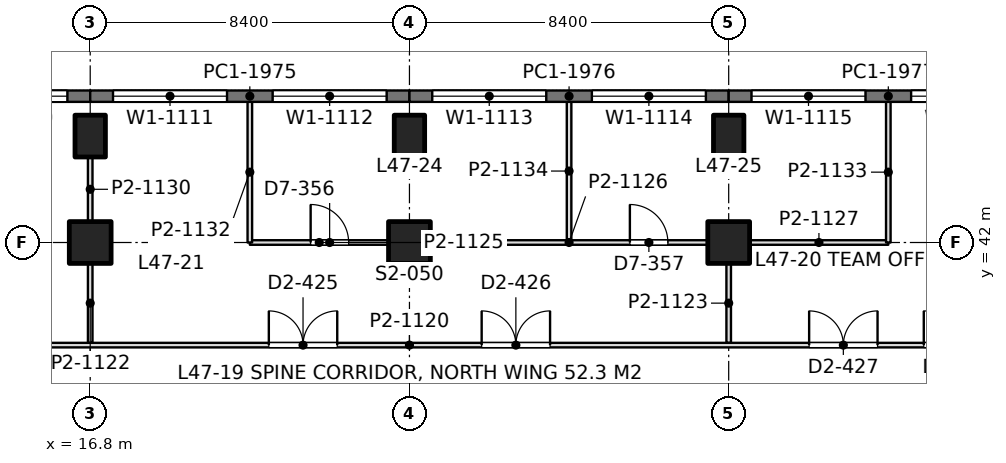
"""IFC4 building model, lengths in metres.
Left out: names, types, materials, properties, quantities, classifications, styles, units other than length and angle.
Written with IfcOpenShell. Run it as: python <this file> out.ifc"""

import sys

from ifc_helpers import new_model, si_unit, direction, frame, frame_2d, origin, origin_2d, place, context, subcontext, project, spatial, rectangle, extrude, element, fill, save


model = new_model("IFC4")
c1 = context("Model", 3, precision=1e-05, world=origin(), true_north=direction((0.0, 1.0)))
c2 = subcontext(c1, "Body", "Model", "MODEL_VIEW")
j1 = project(units=[si_unit("LENGTHUNIT", "METRE"), si_unit("PLANEANGLEUNIT", "RADIAN")], contexts=[c1])
p1 = place(None, origin())
s1 = spatial("IfcSite", under=j1, at=p1, CompositionType="ELEMENT")
p2 = place(p1, origin())
s2 = spatial("IfcBuilding", under=s1, at=p2, CompositionType="ELEMENT")
p3 = place(p2, frame((0.0, 0.0, 207.0)))
s3 = spatial("IfcBuildingStorey", under=s2, at=p3, CompositionType="ELEMENT", Elevation=207.0)
p4 = place(p3, frame((16.8, 42.0, 0.0), z_axis=(0.0, 0.0, 1.0), x_axis=(1.0, 0.0, 0.0)))
e1 = element("IfcColumn", 1, at=p4, inside=s3, PredefinedType="COLUMN", context=c2, shape_type="SweptSolid", body=[
    extrude(rectangle(XDim=1.1, YDim=1.1, at=origin_2d()), origin(), (0.0, 0.0, 1.0), 4.2),
])
p5 = place(p3, frame((16.8, 44.8, 0.0), z_axis=(0.0, 0.0, 1.0), x_axis=(1.0, 0.0, 0.0)))
e2 = element("IfcColumn", 2, at=p5, inside=s3, PredefinedType="COLUMN", context=c2, shape_type="SweptSolid", body=[
    extrude(rectangle(XDim=0.8, YDim=1.1, at=origin_2d()), origin(), (0.0, 0.0, 1.0), 4.2),
])
p6 = place(p3, frame((25.2, 42.0, 0.0), z_axis=(0.0, 0.0, 1.0), x_axis=(1.0, 0.0, 0.0)))
e3 = element("IfcColumn", 3, at=p6, inside=s3, PredefinedType="COLUMN", context=c2, shape_type="SweptSolid", body=[
    extrude(rectangle(XDim=1.1, YDim=1.1, at=origin_2d()), origin(), (0.0, 0.0, 1.0), 4.2),
])
p7 = place(p3, frame((25.2, 44.8, 0.0), z_axis=(0.0, 0.0, 1.0), x_axis=(1.0, 0.0, 0.0)))
e4 = element("IfcColumn", 4, at=p7, inside=s3, PredefinedType="COLUMN", context=c2, shape_type="SweptSolid", body=[
    extrude(rectangle(XDim=0.8, YDim=1.1, at=origin_2d()), origin(), (0.0, 0.0, 1.0), 4.2),
])
p8 = place(p3, frame((33.6, 42.0, 0.0), z_axis=(0.0, 0.0, 1.0), x_axis=(1.0, 0.0, 0.0)))
e5 = element("IfcColumn", 5, at=p8, inside=s3, PredefinedType="COLUMN", context=c2, shape_type="SweptSolid", body=[
    extrude(rectangle(XDim=1.1, YDim=1.1, at=origin_2d()), origin(), (0.0, 0.0, 1.0), 4.2),
])
p9 = place(p3, frame((33.6, 44.8, 0.0), z_axis=(0.0, 0.0, 1.0), x_axis=(1.0, 0.0, 0.0)))
e6 = element("IfcColumn", 6, at=p9, inside=s3, PredefinedType="COLUMN", context=c2, shape_type="SweptSolid", body=[
    extrude(rectangle(XDim=0.8, YDim=1.1, at=origin_2d()), origin(), (0.0, 0.0, 1.0), 4.2),
])
p10 = place(p3, frame((8.4, 45.85, 0.0), z_axis=(0.0, 0.0, 1.0), x_axis=(1.0, 0.0, 0.0)))
e7 = element("IfcWall", 7, at=p10, inside=s3, PredefinedType="SOLIDWALL", context=c2, shape_type="SweptSolid", body=[
    extrude(rectangle(XDim=8.4, YDim=0.3, at=frame_2d((4.2, 0.0))), origin(), (0.0, 0.0, 1.0), 4.05),
])
p11 = place(p10, frame((0.6, 0.0, 0.9)))
e8 = element("IfcOpeningElement", 8, at=p11, cuts=e7, PredefinedType="OPENING", context=c2, shape_type="SweptSolid", body=[
    extrude(rectangle(XDim=3.0, YDim=1.9, at=frame_2d((1.5, 0.95))), frame((0.0, 0.16, 0.0), z_axis=(0.0, -1.0, 0.0), x_axis=(1.0, 0.0, 0.0)), (0.0, 0.0, 1.0), 0.32),
])
p12 = place(p10, frame((4.8, 0.0, 0.9)))
e9 = element("IfcOpeningElement", 9, at=p12, cuts=e7, PredefinedType="OPENING", context=c2, shape_type="SweptSolid", body=[
    extrude(rectangle(XDim=3.0, YDim=1.9, at=frame_2d((1.5, 0.95))), frame((0.0, 0.16, 0.0), z_axis=(0.0, -1.0, 0.0), x_axis=(1.0, 0.0, 0.0)), (0.0, 0.0, 1.0), 0.32),
])
p13 = place(p3, frame((16.8, 45.85, 0.0), z_axis=(0.0, 0.0, 1.0), x_axis=(1.0, 0.0, 0.0)))
e10 = element("IfcWall", 10, at=p13, inside=s3, PredefinedType="SOLIDWALL", context=c2, shape_type="SweptSolid", body=[
    extrude(rectangle(XDim=8.4, YDim=0.3, at=frame_2d((4.2, 0.0))), origin(), (0.0, 0.0, 1.0), 4.05),
])
p14 = place(p13, frame((0.6, 0.0, 0.9)))
e11 = element("IfcOpeningElement", 11, at=p14, cuts=e10, PredefinedType="OPENING", context=c2, shape_type="SweptSolid", body=[
    extrude(rectangle(XDim=3.0, YDim=1.9, at=frame_2d((1.5, 0.95))), frame((0.0, 0.16, 0.0), z_axis=(0.0, -1.0, 0.0), x_axis=(1.0, 0.0, 0.0)), (0.0, 0.0, 1.0), 0.32),
])
p15 = place(p13, frame((4.8, 0.0, 0.9)))
e12 = element("IfcOpeningElement", 12, at=p15, cuts=e10, PredefinedType="OPENING", context=c2, shape_type="SweptSolid", body=[
    extrude(rectangle(XDim=3.0, YDim=1.9, at=frame_2d((1.5, 0.95))), frame((0.0, 0.16, 0.0), z_axis=(0.0, -1.0, 0.0), x_axis=(1.0, 0.0, 0.0)), (0.0, 0.0, 1.0), 0.32),
])
p16 = place(p3, frame((25.2, 45.85, 0.0), z_axis=(0.0, 0.0, 1.0), x_axis=(1.0, 0.0, 0.0)))
e13 = element("IfcWall", 13, at=p16, inside=s3, PredefinedType="SOLIDWALL", context=c2, shape_type="SweptSolid", body=[
    extrude(rectangle(XDim=8.4, YDim=0.3, at=frame_2d((4.2, 0.0))), origin(), (0.0, 0.0, 1.0), 4.05),
])
p17 = place(p16, frame((0.6, 0.0, 0.9)))
e14 = element("IfcOpeningElement", 14, at=p17, cuts=e13, PredefinedType="OPENING", context=c2, shape_type="SweptSolid", body=[
    extrude(rectangle(XDim=3.0, YDim=1.9, at=frame_2d((1.5, 0.95))), frame((0.0, 0.16, 0.0), z_axis=(0.0, -1.0, 0.0), x_axis=(1.0, 0.0, 0.0)), (0.0, 0.0, 1.0), 0.32),
])
p18 = place(p16, frame((4.8, 0.0, 0.9)))
e15 = element("IfcOpeningElement", 15, at=p18, cuts=e13, PredefinedType="OPENING", context=c2, shape_type="SweptSolid", body=[
    extrude(rectangle(XDim=3.0, YDim=1.9, at=frame_2d((1.5, 0.95))), frame((0.0, 0.16, 0.0), z_axis=(0.0, -1.0, 0.0), x_axis=(1.0, 0.0, 0.0)), (0.0, 0.0, 1.0), 0.32),
])
p19 = place(p3, frame((33.6, 45.85, 0.0), z_axis=(0.0, 0.0, 1.0), x_axis=(1.0, 0.0, 0.0)))
e16 = element("IfcWall", 16, at=p19, inside=s3, PredefinedType="SOLIDWALL", context=c2, shape_type="SweptSolid", body=[
    extrude(rectangle(XDim=8.4, YDim=0.3, at=frame_2d((4.2, 0.0))), origin(), (0.0, 0.0, 1.0), 4.05),
])
p20 = place(p19, frame((0.6, 0.0, 0.9)))
e17 = element("IfcOpeningElement", 17, at=p20, cuts=e16, PredefinedType="OPENING", context=c2, shape_type="SweptSolid", body=[
    extrude(rectangle(XDim=3.0, YDim=1.9, at=frame_2d((1.5, 0.95))), frame((0.0, 0.16, 0.0), z_axis=(0.0, -1.0, 0.0), x_axis=(1.0, 0.0, 0.0)), (0.0, 0.0, 1.0), 0.32),
])
p21 = place(p19, frame((4.8, 0.0, 0.9)))
e18 = element("IfcOpeningElement", 18, at=p21, cuts=e16, PredefinedType="OPENING", context=c2, shape_type="SweptSolid", body=[
    extrude(rectangle(XDim=3.0, YDim=1.9, at=frame_2d((1.5, 0.95))), frame((0.0, 0.16, 0.0), z_axis=(0.0, -1.0, 0.0), x_axis=(1.0, 0.0, 0.0)), (0.0, 0.0, 1.0), 0.32),
])
p22 = place(p3, frame((21.0, 42.0, 0.0), z_axis=(0.0, 0.0, 1.0), x_axis=(1.0, 0.0, 0.0)))
e19 = element("IfcWall", 19, at=p22, inside=s3, PredefinedType="PARTITIONING", context=c2, shape_type="SweptSolid", body=[
    extrude(rectangle(XDim=3.651, YDim=0.12, at=frame_2d((1.825, 0.0))), origin(), (0.0, 0.0, 1.0), 3.55),
])
p23 = place(p22, frame((1.6, 0.0, 0.0)))
e20 = element("IfcOpeningElement", 20, at=p23, cuts=e19, PredefinedType="OPENING", context=c2, shape_type="SweptSolid", body=[
    extrude(rectangle(XDim=1.0, YDim=2.4, at=frame_2d((0.5, 1.2))), frame((0.0, 0.07, 0.0), z_axis=(0.0, -1.0, 0.0), x_axis=(1.0, 0.0, 0.0)), (0.0, 0.0, 1.0), 0.14),
])
p24 = place(p3, frame((25.749, 42.0, 0.0), z_axis=(0.0, 0.0, 1.0), x_axis=(1.0, 0.0, 0.0)))
e21 = element("IfcWall", 21, at=p24, inside=s3, PredefinedType="PARTITIONING", context=c2, shape_type="SweptSolid", body=[
    extrude(rectangle(XDim=7.302, YDim=0.12, at=frame_2d((3.651, 0.0))), origin(), (0.0, 0.0, 1.0), 3.55),
])
p25 = place(p24, frame((5.251, 0.0, 0.0)))
e22 = element("IfcOpeningElement", 22, at=p25, cuts=e21, PredefinedType="OPENING", context=c2, shape_type="SweptSolid", body=[
    extrude(rectangle(XDim=1.0, YDim=2.4, at=frame_2d((0.5, 1.2))), frame((0.0, 0.07, 0.0), z_axis=(0.0, -1.0, 0.0), x_axis=(1.0, 0.0, 0.0)), (0.0, 0.0, 1.0), 0.14),
])
p26 = place(p3, frame((34.149, 42.0, 0.0), z_axis=(0.0, 0.0, 1.0), x_axis=(1.0, 0.0, 0.0)))
e23 = element("IfcWall", 23, at=p26, inside=s3, PredefinedType="PARTITIONING", context=c2, shape_type="SweptSolid", body=[
    extrude(rectangle(XDim=3.651, YDim=0.12, at=frame_2d((1.826, 0.0))), origin(), (0.0, 0.0, 1.0), 3.55),
])
p27 = place(p3, frame((21.0, 42.0, 0.0), z_axis=(0.0, 0.0, 1.0), x_axis=(0.0, 1.0, 0.0)))
e24 = element("IfcWall", 24, at=p27, inside=s3, PredefinedType="PARTITIONING", context=c2, shape_type="SweptSolid", body=[
    extrude(rectangle(XDim=3.702, YDim=0.12, at=frame_2d((1.851, 0.0))), origin(), (0.0, 0.0, 1.0), 3.55),
])
p28 = place(p3, frame((29.4, 42.058, 0.0), z_axis=(0.0, 0.0, 1.0), x_axis=(0.0, 1.0, 0.0)))
e25 = element("IfcWall", 25, at=p28, inside=s3, PredefinedType="PARTITIONING", context=c2, shape_type="SweptSolid", body=[
    extrude(rectangle(XDim=3.644, YDim=0.12, at=frame_2d((1.822, 0.0))), origin(), (0.0, 0.0, 1.0), 3.55),
])
p29 = place(p3, frame((37.8, 42.0, 0.0), z_axis=(0.0, 0.0, 1.0), x_axis=(0.0, 1.0, 0.0)))
e26 = element("IfcWall", 26, at=p29, inside=s3, PredefinedType="PARTITIONING", context=c2, shape_type="SweptSolid", body=[
    extrude(rectangle(XDim=3.702, YDim=0.12, at=frame_2d((1.851, 0.0))), origin(), (0.0, 0.0, 1.0), 3.55),
])
p30 = place(p3, frame((16.8, 39.358, 0.0), z_axis=(0.0, 0.0, 1.0), x_axis=(0.0, 1.0, 0.0)))
e27 = element("IfcWall", 27, at=p30, inside=s3, PredefinedType="PARTITIONING", context=c2, shape_type="SweptSolid", body=[
    extrude(rectangle(XDim=2.093, YDim=0.12, at=frame_2d((1.046, 0.0))), origin(), (0.0, 0.0, 1.0), 3.69),
])
p31 = place(p3, frame((16.8, 42.549, 0.0), z_axis=(0.0, 0.0, 1.0), x_axis=(0.0, 1.0, 0.0)))
e28 = element("IfcWall", 28, at=p31, inside=s3, PredefinedType="PARTITIONING", context=c2, shape_type="SweptSolid", body=[
    extrude(rectangle(XDim=1.702, YDim=0.12, at=frame_2d((0.851, 0.0))), origin(), (0.0, 0.0, 1.0), 3.69),
])
p32 = place(p3, frame((33.6, 39.358, 0.0), z_axis=(0.0, 0.0, 1.0), x_axis=(0.0, 1.0, 0.0)))
e29 = element("IfcWall", 29, at=p32, inside=s3, PredefinedType="PARTITIONING", context=c2, shape_type="SweptSolid", body=[
    extrude(rectangle(XDim=2.093, YDim=0.12, at=frame_2d((1.046, 0.0))), origin(), (0.0, 0.0, 1.0), 3.69),
])
p33 = place(p3, frame((7.748, 39.3, 0.0), z_axis=(0.0, 0.0, 1.0), x_axis=(1.0, 0.0, 0.0)))
e30 = element("IfcWall", 30, at=p33, inside=s3, PredefinedType="PARTITIONING", context=c2, shape_type="SweptSolid", body=[
    extrude(rectangle(XDim=34.904, YDim=0.12, at=frame_2d((17.452, 0.0))), origin(), (0.0, 0.0, 1.0), 3.55),
])
p34 = place(p33, frame((2.119, 0.0, 0.0)))
e31 = element("IfcOpeningElement", 31, at=p34, cuts=e30, PredefinedType="OPENING", context=c2, shape_type="SweptSolid", body=[
    extrude(rectangle(XDim=1.8, YDim=2.2, at=frame_2d((0.9, 1.1))), frame((0.0, 0.07, 0.0), z_axis=(0.0, -1.0, 0.0), x_axis=(1.0, 0.0, 0.0)), (0.0, 0.0, 1.0), 0.14),
])
p35 = place(p33, frame((5.135, 0.0, 0.0)))
e32 = element("IfcOpeningElement", 32, at=p35, cuts=e30, PredefinedType="OPENING", context=c2, shape_type="SweptSolid", body=[
    extrude(rectangle(XDim=1.8, YDim=2.2, at=frame_2d((0.9, 1.1))), frame((0.0, 0.07, 0.0), z_axis=(0.0, -1.0, 0.0), x_axis=(1.0, 0.0, 0.0)), (0.0, 0.0, 1.0), 0.14),
])
p36 = place(p33, frame((13.752, 0.0, 0.0)))
e33 = element("IfcOpeningElement", 33, at=p36, cuts=e30, PredefinedType="OPENING", context=c2, shape_type="SweptSolid", body=[
    extrude(rectangle(XDim=1.8, YDim=2.2, at=frame_2d((0.9, 1.1))), frame((0.0, 0.07, 0.0), z_axis=(0.0, -1.0, 0.0), x_axis=(1.0, 0.0, 0.0)), (0.0, 0.0, 1.0), 0.14),
])
p37 = place(p33, frame((19.352, 0.0, 0.0)))
e34 = element("IfcOpeningElement", 34, at=p37, cuts=e30, PredefinedType="OPENING", context=c2, shape_type="SweptSolid", body=[
    extrude(rectangle(XDim=1.8, YDim=2.2, at=frame_2d((0.9, 1.1))), frame((0.0, 0.07, 0.0), z_axis=(0.0, -1.0, 0.0), x_axis=(1.0, 0.0, 0.0)), (0.0, 0.0, 1.0), 0.14),
])
p38 = place(p33, frame((27.969, 0.0, 0.0)))
e35 = element("IfcOpeningElement", 35, at=p38, cuts=e30, PredefinedType="OPENING", context=c2, shape_type="SweptSolid", body=[
    extrude(rectangle(XDim=1.8, YDim=2.2, at=frame_2d((0.9, 1.1))), frame((0.0, 0.07, 0.0), z_axis=(0.0, -1.0, 0.0), x_axis=(1.0, 0.0, 0.0)), (0.0, 0.0, 1.0), 0.14),
])
p39 = place(p33, frame((30.985, 0.0, 0.0)))
e36 = element("IfcOpeningElement", 36, at=p39, cuts=e30, PredefinedType="OPENING", context=c2, shape_type="SweptSolid", body=[
    extrude(rectangle(XDim=1.8, YDim=2.2, at=frame_2d((0.9, 1.1))), frame((0.0, 0.07, 0.0), z_axis=(0.0, -1.0, 0.0), x_axis=(1.0, 0.0, 0.0)), (0.0, 0.0, 1.0), 0.14),
])
p40 = place(p12, origin())
e37 = element("IfcWindow", 37, at=p40, inside=s3, PartitioningType="SINGLE_PANEL", PredefinedType="WINDOW", context=c2, shape_type="SweptSolid", body=[
    extrude(rectangle(XDim=3.0, YDim=1.9, at=frame_2d((1.5, 0.95))), frame((0.0, 0.03, 0.0), z_axis=(0.0, -1.0, 0.0), x_axis=(1.0, 0.0, 0.0)), (0.0, 0.0, 1.0), 0.06),
])
fill(e9, e37)
p41 = place(p14, origin())
e38 = element("IfcWindow", 38, at=p41, inside=s3, PartitioningType="SINGLE_PANEL", PredefinedType="WINDOW", context=c2, shape_type="SweptSolid", body=[
    extrude(rectangle(XDim=3.0, YDim=1.9, at=frame_2d((1.5, 0.95))), frame((0.0, 0.03, 0.0), z_axis=(0.0, -1.0, 0.0), x_axis=(1.0, 0.0, 0.0)), (0.0, 0.0, 1.0), 0.06),
])
fill(e11, e38)
p42 = place(p15, origin())
e39 = element("IfcWindow", 39, at=p42, inside=s3, PartitioningType="SINGLE_PANEL", PredefinedType="WINDOW", context=c2, shape_type="SweptSolid", body=[
    extrude(rectangle(XDim=3.0, YDim=1.9, at=frame_2d((1.5, 0.95))), frame((0.0, 0.03, 0.0), z_axis=(0.0, -1.0, 0.0), x_axis=(1.0, 0.0, 0.0)), (0.0, 0.0, 1.0), 0.06),
])
fill(e12, e39)
p43 = place(p17, origin())
e40 = element("IfcWindow", 40, at=p43, inside=s3, PartitioningType="SINGLE_PANEL", PredefinedType="WINDOW", context=c2, shape_type="SweptSolid", body=[
    extrude(rectangle(XDim=3.0, YDim=1.9, at=frame_2d((1.5, 0.95))), frame((0.0, 0.03, 0.0), z_axis=(0.0, -1.0, 0.0), x_axis=(1.0, 0.0, 0.0)), (0.0, 0.0, 1.0), 0.06),
])
fill(e14, e40)
p44 = place(p18, origin())
e41 = element("IfcWindow", 41, at=p44, inside=s3, PartitioningType="SINGLE_PANEL", PredefinedType="WINDOW", context=c2, shape_type="SweptSolid", body=[
    extrude(rectangle(XDim=3.0, YDim=1.9, at=frame_2d((1.5, 0.95))), frame((0.0, 0.03, 0.0), z_axis=(0.0, -1.0, 0.0), x_axis=(1.0, 0.0, 0.0)), (0.0, 0.0, 1.0), 0.06),
])
fill(e15, e41)
p45 = place(p20, origin())
e42 = element("IfcWindow", 42, at=p45, inside=s3, PartitioningType="SINGLE_PANEL", PredefinedType="WINDOW", context=c2, shape_type="SweptSolid", body=[
    extrude(rectangle(XDim=3.0, YDim=1.9, at=frame_2d((1.5, 0.95))), frame((0.0, 0.03, 0.0), z_axis=(0.0, -1.0, 0.0), x_axis=(1.0, 0.0, 0.0)), (0.0, 0.0, 1.0), 0.06),
])
fill(e17, e42)
p46 = place(p21, origin())
e43 = element("IfcWindow", 43, at=p46, inside=s3, PartitioningType="SINGLE_PANEL", PredefinedType="WINDOW", context=c2, shape_type="SweptSolid", body=[
    extrude(rectangle(XDim=3.0, YDim=1.9, at=frame_2d((1.5, 0.95))), frame((0.0, 0.03, 0.0), z_axis=(0.0, -1.0, 0.0), x_axis=(1.0, 0.0, 0.0)), (0.0, 0.0, 1.0), 0.06),
])
fill(e18, e43)
p47 = place(p23, origin())
e44 = element("IfcDoor", 44, at=p47, inside=s3, OperationType="SINGLE_SWING_LEFT", PredefinedType="DOOR", context=c2, shape_type="SweptSolid", body=[
    extrude(rectangle(XDim=1.0, YDim=2.4, at=frame_2d((0.5, 1.2))), frame((0.0, 0.025, 0.0), z_axis=(0.0, -1.0, 0.0), x_axis=(1.0, 0.0, 0.0)), (0.0, 0.0, 1.0), 0.05),
])
fill(e20, e44)
p48 = place(p25, origin())
e45 = element("IfcDoor", 45, at=p48, inside=s3, OperationType="SINGLE_SWING_LEFT", PredefinedType="DOOR", context=c2, shape_type="SweptSolid", body=[
    extrude(rectangle(XDim=1.0, YDim=2.4, at=frame_2d((0.5, 1.2))), frame((0.0, 0.025, 0.0), z_axis=(0.0, -1.0, 0.0), x_axis=(1.0, 0.0, 0.0)), (0.0, 0.0, 1.0), 0.05),
])
fill(e22, e45)
p49 = place(p36, origin())
e46 = element("IfcDoor", 46, at=p49, inside=s3, OperationType="DOUBLE_DOOR_SINGLE_SWING", PredefinedType="DOOR", context=c2, shape_type="SweptSolid", body=[
    extrude(rectangle(XDim=1.8, YDim=2.2, at=frame_2d((0.9, 1.1))), frame((0.0, 0.025, 0.0), z_axis=(0.0, -1.0, 0.0), x_axis=(1.0, 0.0, 0.0)), (0.0, 0.0, 1.0), 0.05),
])
fill(e33, e46)
p50 = place(p37, origin())
e47 = element("IfcDoor", 47, at=p50, inside=s3, OperationType="DOUBLE_DOOR_SINGLE_SWING", PredefinedType="DOOR", context=c2, shape_type="SweptSolid", body=[
    extrude(rectangle(XDim=1.8, YDim=2.2, at=frame_2d((0.9, 1.1))), frame((0.0, 0.025, 0.0), z_axis=(0.0, -1.0, 0.0), x_axis=(1.0, 0.0, 0.0)), (0.0, 0.0, 1.0), 0.05),
])
fill(e34, e47)
p51 = place(p38, origin())
e48 = element("IfcDoor", 48, at=p51, inside=s3, OperationType="DOUBLE_DOOR_SINGLE_SWING", PredefinedType="DOOR", context=c2, shape_type="SweptSolid", body=[
    extrude(rectangle(XDim=1.8, YDim=2.2, at=frame_2d((0.9, 1.1))), frame((0.0, 0.025, 0.0), z_axis=(0.0, -1.0, 0.0), x_axis=(1.0, 0.0, 0.0)), (0.0, 0.0, 1.0), 0.05),
])
fill(e35, e48)
p52 = place(p39, origin())
e49 = element("IfcDoor", 49, at=p52, inside=s3, OperationType="DOUBLE_DOOR_SINGLE_SWING", PredefinedType="DOOR", context=c2, shape_type="SweptSolid", body=[
    extrude(rectangle(XDim=1.8, YDim=2.2, at=frame_2d((0.9, 1.1))), frame((0.0, 0.025, 0.0), z_axis=(0.0, -1.0, 0.0), x_axis=(1.0, 0.0, 0.0)), (0.0, 0.0, 1.0), 0.05),
])
fill(e36, e49)
save(model, sys.argv[1])
